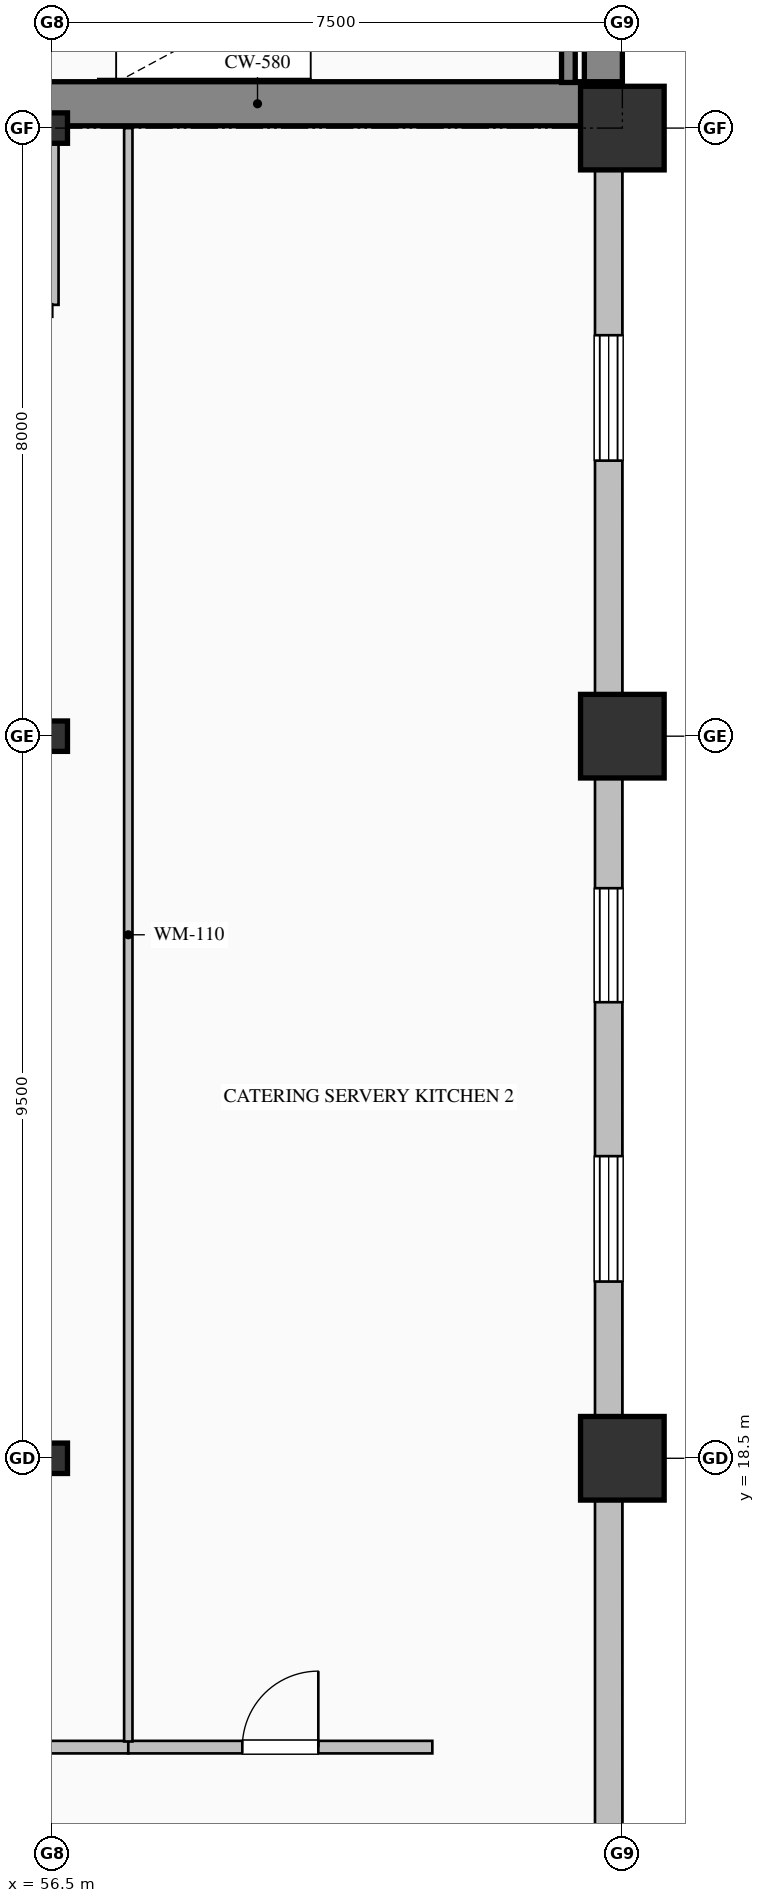
"""IFC4 building model, lengths in metres.
Left out: names, types, materials, properties, quantities, classifications, styles, units other than length and angle.
Written with IfcOpenShell. Run it as: python <this file> out.ifc"""

import sys

from ifc_helpers import new_model, si_unit, direction, frame, frame_2d, origin, origin_2d, place, context, subcontext, project, spatial, rectangle, hollow_rectangle, i_section, extrude, element, fill, save


model = new_model("IFC4")
c1 = context("Model", 3, precision=1e-05, world=origin(), true_north=direction((0.0, 1.0)))
c2 = subcontext(c1, "Body", "Model", "MODEL_VIEW")
j1 = project(units=[si_unit("LENGTHUNIT", "METRE"), si_unit("PLANEANGLEUNIT", "RADIAN")], contexts=[c1])
p1 = place(None, origin())
s1 = spatial("IfcSite", under=j1, at=p1, CompositionType="ELEMENT")
p2 = place(p1, origin())
s2 = spatial("IfcBuilding", under=s1, at=p2, CompositionType="ELEMENT")
p3 = place(p2, frame((0.0, 0.0, 155.0)))
s3 = spatial("IfcBuildingStorey", under=s2, at=p3, CompositionType="ELEMENT", Elevation=155.0)
p4 = place(p3, frame((63.75, 36.32, 0.0), z_axis=(0.0, 0.0, 1.0), x_axis=(0.0, 1.0, 0.0)))
e1 = element("IfcWall", 1, at=p4, inside=s3, PredefinedType="SHEAR", context=c2, shape_type="SweptSolid", body=[
    extrude(rectangle(XDim=15.18, YDim=0.5, at=frame_2d((7.59, 0.0))), origin(), (0.0, 0.0, 1.0), 3.765),
])
p5 = place(p3, frame((54.4, 36.32, 0.0), z_axis=(0.0, 0.0, 1.0), x_axis=(1.0, 0.0, 0.0)))
e2 = element("IfcWall", 2, at=p5, inside=s3, PredefinedType="SHEAR", context=c2, shape_type="SweptSolid", body=[
    extrude(rectangle(XDim=9.6, YDim=0.58, at=frame_2d((4.8, 0.0))), origin(), (0.0, 0.0, 1.0), 4.0),
])
for number, where, z_axis, x_axis in (
    (3, (56.5, 18.5, 0.0), (0.0, 0.0, 1.0), (1.0, 0.0, 0.0)),
    (4, (56.5, 28.0, 0.0), (0.0, 0.0, 1.0), (1.0, 0.0, 0.0)),
    (5, (56.5, 36.0, 0.0), (0.0, 0.0, 1.0), (1.0, 0.0, 0.0)),
):
    element("IfcColumn", number, at=place(p3, frame(where, z_axis=z_axis, x_axis=x_axis)), inside=s3, PredefinedType="COLUMN", context=c2, shape_type="SweptSolid", body=[
        extrude(i_section(OverallWidth=0.4, OverallDepth=0.4, WebThickness=0.013, FlangeThickness=0.021, FilletRadius=0.022, at=origin_2d()), origin(), (0.0, 0.0, 1.0), 4.0),
    ])
for number, where, z_axis, x_axis in (
    (6, (64.0, 18.5, 0.0), (0.0, 0.0, 1.0), (1.0, 0.0, 0.0)),
    (7, (64.0, 28.0, 0.0), (0.0, 0.0, 1.0), (1.0, 0.0, 0.0)),
    (8, (64.0, 36.0, 0.0), (0.0, 0.0, 1.0), (1.0, 0.0, 0.0)),
):
    element("IfcColumn", number, at=place(p3, frame(where, z_axis=z_axis, x_axis=x_axis)), inside=s3, PredefinedType="COLUMN", context=c2, shape_type="SweptSolid", body=[
        extrude(hollow_rectangle(XDim=1.1, YDim=1.1, WallThickness=0.04, at=origin_2d()), origin(), (0.0, 0.0, 1.0), 4.0),
    ])
p6 = place(p3, frame((63.82, 36.05, 0.0), z_axis=(0.0, 0.0, 1.0), x_axis=(0.0, -1.0, 0.0)))
e9 = element("IfcWall", 9, at=p6, inside=s3, PredefinedType="SOLIDWALL", context=c2, shape_type="SweptSolid", body=[
    extrude(rectangle(XDim=28.05, YDim=0.36, at=frame_2d((14.025, 0.0))), origin(), (0.0, 0.0, 1.0), 3.265),
])
p7 = place(p6, frame((2.775, 0.0, 0.85)))
e10 = element("IfcOpeningElement", 10, at=p7, cuts=e9, PredefinedType="OPENING", context=c2, shape_type="SweptSolid", body=[
    extrude(rectangle(XDim=1.65, YDim=1.95, at=frame_2d((0.825, 0.975))), frame((0.0, 0.19, 0.0), z_axis=(0.0, -1.0, 0.0), x_axis=(1.0, 0.0, 0.0)), (0.0, 0.0, 1.0), 0.38),
])
p8 = place(p6, frame((10.05, 0.0, 0.85)))
e11 = element("IfcOpeningElement", 11, at=p8, cuts=e9, PredefinedType="OPENING", context=c2, shape_type="SweptSolid", body=[
    extrude(rectangle(XDim=1.5, YDim=1.95, at=frame_2d((0.75, 0.975))), frame((0.0, 0.19, 0.0), z_axis=(0.0, -1.0, 0.0), x_axis=(1.0, 0.0, 0.0)), (0.0, 0.0, 1.0), 0.38),
])
p9 = place(p6, frame((13.575, 0.0, 0.85)))
e12 = element("IfcOpeningElement", 12, at=p9, cuts=e9, PredefinedType="OPENING", context=c2, shape_type="SweptSolid", body=[
    extrude(rectangle(XDim=1.65, YDim=1.95, at=frame_2d((0.825, 0.975))), frame((0.0, 0.19, 0.0), z_axis=(0.0, -1.0, 0.0), x_axis=(1.0, 0.0, 0.0)), (0.0, 0.0, 1.0), 0.38),
])
p10 = place(p3, frame((63.29, 36.6, 0.0), z_axis=(0.0, 0.0, 1.0), x_axis=(0.0, 1.0, 0.0)))
e13 = element("IfcWall", 13, at=p10, inside=s3, PredefinedType="SOLIDWALL", context=c2, shape_type="SweptSolid", body=[
    extrude(rectangle(XDim=3.15, YDim=0.18, at=frame_2d((1.575, 0.0))), origin(), (0.0, 0.0, 1.0), 4.0),
])
p11 = place(p3, frame((56.5, 36.0, 0.0), z_axis=(0.0, 0.0, 1.0), x_axis=(0.0, -1.0, 0.0)))
e14 = element("IfcWall", 14, at=p11, inside=s3, PredefinedType="PARTITIONING", context=c2, shape_type="SweptSolid", body=[
    extrude(rectangle(XDim=2.325, YDim=0.165, at=frame_2d((1.163, 0.0))), origin(), (0.0, 0.0, 1.0), 3.157),
])
p12 = place(p3, frame((53.0, 14.7, 0.0), z_axis=(0.0, 0.0, 1.0), x_axis=(1.0, 0.0, 0.0)))
e15 = element("IfcWall", 15, at=p12, inside=s3, PredefinedType="PARTITIONING", context=c2, shape_type="SweptSolid", body=[
    extrude(rectangle(XDim=4.5, YDim=0.165, at=frame_2d((2.25, 0.0))), origin(), (0.0, 0.0, 1.0), 3.765),
])
p13 = place(p3, frame((57.5, 14.7, 0.0), z_axis=(0.0, 0.0, 1.0), x_axis=(1.0, 0.0, 0.0)))
e16 = element("IfcWall", 16, at=p13, inside=s3, PredefinedType="PARTITIONING", context=c2, shape_type="SweptSolid", body=[
    extrude(rectangle(XDim=4.0, YDim=0.165, at=frame_2d((2.0, 0.0))), origin(), (0.0, 0.0, 1.0), 3.765),
])
p14 = place(p13, frame((1.5, 0.0, 0.0)))
e17 = element("IfcOpeningElement", 17, at=p14, cuts=e16, PredefinedType="OPENING", context=c2, shape_type="SweptSolid", body=[
    extrude(rectangle(XDim=1.0, YDim=2.15, at=frame_2d((0.5, 1.075))), frame((0.0, 0.093, 0.0), z_axis=(0.0, -1.0, 0.0), x_axis=(1.0, 0.0, 0.0)), (0.0, 0.0, 1.0), 0.185),
])
p15 = place(p3, frame((57.5, 36.0, 0.0), z_axis=(0.0, 0.0, 1.0), x_axis=(0.0, -1.0, 0.0)))
e18 = element("IfcWall", 18, at=p15, inside=s3, PredefinedType="MOVABLE", context=c2, shape_type="SweptSolid", body=[
    extrude(rectangle(XDim=21.226, YDim=0.11, at=frame_2d((10.613, 0.0))), origin(), (0.0, 0.0, 1.0), 3.765),
])
p16 = place(p7, origin())
e19 = element("IfcWindow", 19, at=p16, inside=s3, PartitioningType="DOUBLE_PANEL_VERTICAL", PredefinedType="WINDOW", context=c2, shape_type="SweptSolid", body=[
    extrude(rectangle(XDim=1.65, YDim=1.95, at=frame_2d((0.825, 0.975))), frame((0.0, 0.15, 0.0), z_axis=(0.0, -1.0, 0.0), x_axis=(1.0, 0.0, 0.0)), (0.0, 0.0, 1.0), 0.06),
])
fill(e10, e19)
p17 = place(p8, origin())
e20 = element("IfcWindow", 20, at=p17, inside=s3, PartitioningType="DOUBLE_PANEL_VERTICAL", PredefinedType="WINDOW", context=c2, shape_type="SweptSolid", body=[
    extrude(rectangle(XDim=1.5, YDim=1.95, at=frame_2d((0.75, 0.975))), frame((0.0, 0.15, 0.0), z_axis=(0.0, -1.0, 0.0), x_axis=(1.0, 0.0, 0.0)), (0.0, 0.0, 1.0), 0.06),
])
fill(e11, e20)
p18 = place(p9, origin())
e21 = element("IfcWindow", 21, at=p18, inside=s3, PartitioningType="DOUBLE_PANEL_VERTICAL", PredefinedType="WINDOW", context=c2, shape_type="SweptSolid", body=[
    extrude(rectangle(XDim=1.65, YDim=1.95, at=frame_2d((0.825, 0.975))), frame((0.0, 0.15, 0.0), z_axis=(0.0, -1.0, 0.0), x_axis=(1.0, 0.0, 0.0)), (0.0, 0.0, 1.0), 0.06),
])
fill(e12, e21)
p19 = place(p14, origin())
e22 = element("IfcDoor", 22, at=p19, inside=s3, OperationType="SINGLE_SWING_RIGHT", PredefinedType="DOOR", context=c2, shape_type="SweptSolid", body=[
    extrude(rectangle(XDim=1.0, YDim=2.15, at=frame_2d((0.5, 1.075))), frame((0.0, 0.025, 0.0), z_axis=(0.0, -1.0, 0.0), x_axis=(1.0, 0.0, 0.0)), (0.0, 0.0, 1.0), 0.05),
])
fill(e17, e22)
save(model, sys.argv[1])
